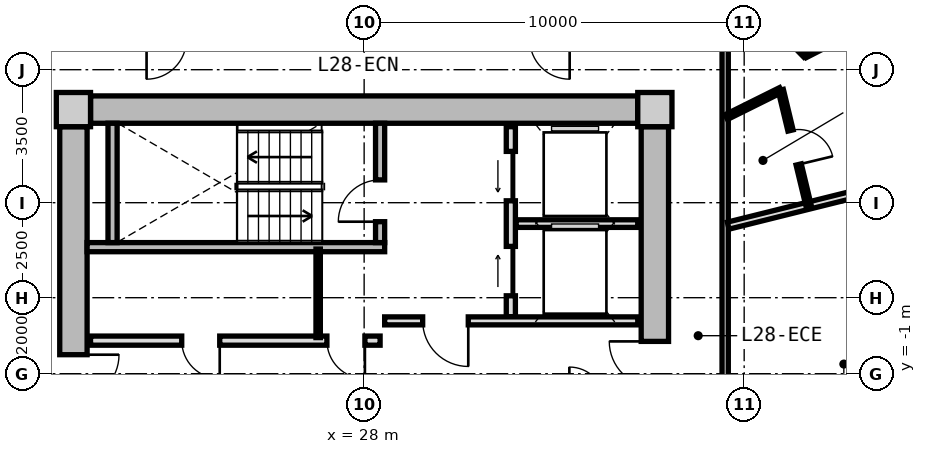
"""IFC4 building model, lengths in metres.
Left out: names, types, materials, properties, quantities, classifications, styles, units other than length and angle.
Written with IfcOpenShell. Run it as: python <this file> out.ifc"""

import sys

from ifc_helpers import new_model, si_unit, direction, frame, frame_2d, origin, origin_2d, place, context, subcontext, project, spatial, rectangle, extrude, source, transform, mapped, element, fill, save


model = new_model("IFC4")
c1 = context("Model", 3, precision=1e-05, world=origin(), true_north=direction((0.0, 1.0)))
c2 = subcontext(c1, "Body", "Model", "MODEL_VIEW")
j1 = project(units=[si_unit("LENGTHUNIT", "METRE"), si_unit("PLANEANGLEUNIT", "RADIAN")], contexts=[c1])
p1 = place(None, origin())
s1 = spatial("IfcSite", under=j1, at=p1, CompositionType="ELEMENT")
p2 = place(p1, origin())
s2 = spatial("IfcBuilding", under=s1, at=p2, CompositionType="ELEMENT")
p3 = place(p2, frame((0.0, 0.0, 93.2)))
s3 = spatial("IfcBuildingStorey", under=s2, at=p3, CompositionType="ELEMENT", Elevation=93.2)
m1 = source(origin(), c2, "Body", "SweptSolid", [
    extrude(rectangle(XDim=0.9, YDim=0.9, at=origin_2d()), origin(), (0.0, 0.0, 1.0), 3.05),
])
for number, where, z_axis, x_axis in (
    (1, (35.65, 5.95, 0.0), (0.0, 0.0, 1.0), (1.0, 0.0, 0.0)),
    (2, (20.35, 5.95, 0.0), (0.0, 0.0, 1.0), (1.0, 0.0, 0.0)),
):
    element("IfcColumn", number, at=place(p3, frame(where, z_axis=z_axis, x_axis=x_axis)), inside=s3, PredefinedType="COLUMN", context=c2, shape_type="MappedRepresentation", body=[
        mapped(m1, transform((0.0, 0.0, 0.0), x_axis=(1.0, 0.0, 0.0), y_axis=(0.0, 1.0, 0.0), z_axis=(0.0, 0.0, 1.0), scale=1.0)),
    ])
m2 = source(origin(), c2, "Body", "SweptSolid", [
    extrude(rectangle(XDim=14.4, YDim=0.72, at=frame_2d((7.2, 0.0))), origin(), (0.0, 0.0, 1.0), 2.79),
])
p4 = place(p3, frame((20.8, 5.95, 0.0), z_axis=(0.0, 0.0, 1.0), x_axis=(1.0, 0.0, 0.0)))
e3 = element("IfcWall", 3, at=p4, inside=s3, PredefinedType="SHEAR", context=c2, shape_type="MappedRepresentation", body=[
    mapped(m2, transform((0.0, 0.0, 0.0), x_axis=(1.0, 0.0, 0.0), y_axis=(0.0, 1.0, 0.0), z_axis=(0.0, 0.0, 1.0), scale=1.0)),
])
m3 = source(origin(), c2, "Body", "SweptSolid", [
    extrude(rectangle(XDim=11.0, YDim=0.72, at=frame_2d((5.5, 0.0))), origin(), (0.0, 0.0, 1.0), 2.79),
])
p5 = place(p3, frame((20.35, -5.5, 0.0), z_axis=(0.0, 0.0, 1.0), x_axis=(0.0, 1.0, 0.0)))
e4 = element("IfcWall", 4, at=p5, inside=s3, PredefinedType="SHEAR", context=c2, shape_type="MappedRepresentation", body=[
    mapped(m3, transform((0.0, 0.0, 0.0), x_axis=(1.0, 0.0, 0.0), y_axis=(0.0, 1.0, 0.0), z_axis=(0.0, 0.0, 1.0), scale=1.0)),
])
p6 = place(p5, frame((3.8, 0.0, 0.0)))
e5 = element("IfcOpeningElement", 5, at=p6, cuts=e4, PredefinedType="OPENING", context=c2, shape_type="SweptSolid", body=[
    extrude(rectangle(XDim=1.2, YDim=2.15, at=frame_2d((0.6, 1.075))), frame((0.0, 0.37, 0.0), z_axis=(0.0, -1.0, 0.0), x_axis=(1.0, 0.0, 0.0)), (0.0, 0.0, 1.0), 0.74),
])
p7 = place(p3, frame((35.65, 5.5, 0.0), z_axis=(0.0, 0.0, 1.0), x_axis=(0.0, -1.0, 0.0)))
e6 = element("IfcWall", 6, at=p7, inside=s3, PredefinedType="SHEAR", context=c2, shape_type="MappedRepresentation", body=[
    mapped(m3, transform((0.0, 0.0, 0.0), x_axis=(1.0, 0.0, 0.0), y_axis=(0.0, 1.0, 0.0), z_axis=(0.0, 0.0, 1.0), scale=1.0)),
])
p8 = place(p7, frame((5.65, 0.0, 0.0)))
e7 = element("IfcOpeningElement", 7, at=p8, cuts=e6, PredefinedType="OPENING", context=c2, shape_type="SweptSolid", body=[
    extrude(rectangle(XDim=1.2, YDim=2.15, at=frame_2d((0.6, 1.075))), frame((0.0, 0.37, 0.0), z_axis=(0.0, -1.0, 0.0), x_axis=(1.0, 0.0, 0.0)), (0.0, 0.0, 1.0), 0.74),
])
p9 = place(p7, frame((9.3, 0.0, 0.0)))
e8 = element("IfcOpeningElement", 8, at=p9, cuts=e6, PredefinedType="OPENING", context=c2, shape_type="SweptSolid", body=[
    extrude(rectangle(XDim=1.0, YDim=2.1, at=frame_2d((0.5, 1.05))), frame((0.0, 0.37, 0.0), z_axis=(0.0, -1.0, 0.0), x_axis=(1.0, 0.0, 0.0)), (0.0, 0.0, 1.0), 0.74),
])
m4 = source(origin(), c2, "Body", "SweptSolid", [
    extrude(rectangle(XDim=7.83, YDim=0.24, at=frame_2d((3.915, 0.0))), origin(), (0.0, 0.0, 1.0), 2.79),
])
p10 = place(p3, frame((20.71, 2.33, 0.0), z_axis=(0.0, 0.0, 1.0), x_axis=(1.0, 0.0, 0.0)))
e9 = element("IfcWall", 9, at=p10, inside=s3, PredefinedType="PARTITIONING", context=c2, shape_type="MappedRepresentation", body=[
    mapped(m4, transform((0.0, 0.0, 0.0), x_axis=(1.0, 0.0, 0.0), y_axis=(0.0, 1.0, 0.0), z_axis=(0.0, 0.0, 1.0), scale=1.0)),
])
m5 = source(origin(), c2, "Body", "SweptSolid", [
    extrude(rectangle(XDim=3.14, YDim=0.24, at=frame_2d((1.57, 0.0))), origin(), (0.0, 0.0, 1.0), 2.79),
])
p11 = place(p3, frame((21.38, 2.45, 0.0), z_axis=(0.0, 0.0, 1.0), x_axis=(0.0, 1.0, 0.0)))
e10 = element("IfcWall", 10, at=p11, inside=s3, PredefinedType="PARTITIONING", context=c2, shape_type="MappedRepresentation", body=[
    mapped(m5, transform((0.0, 0.0, 0.0), x_axis=(1.0, 0.0, 0.0), y_axis=(0.0, 1.0, 0.0), z_axis=(0.0, 0.0, 1.0), scale=1.0)),
])
p12 = place(p3, frame((28.42, 2.45, 0.0), z_axis=(0.0, 0.0, 1.0), x_axis=(0.0, 1.0, 0.0)))
e11 = element("IfcWall", 11, at=p12, inside=s3, PredefinedType="PARTITIONING", context=c2, shape_type="MappedRepresentation", body=[
    mapped(m5, transform((0.0, 0.0, 0.0), x_axis=(1.0, 0.0, 0.0), y_axis=(0.0, 1.0, 0.0), z_axis=(0.0, 0.0, 1.0), scale=1.0)),
])
p13 = place(p12, frame((0.55, 0.0, 0.0)))
e12 = element("IfcOpeningElement", 12, at=p13, cuts=e11, PredefinedType="OPENING", context=c2, shape_type="SweptSolid", body=[
    extrude(rectangle(XDim=1.1, YDim=2.15, at=frame_2d((0.55, 1.075))), frame((0.0, 0.13, 0.0), z_axis=(0.0, -1.0, 0.0), x_axis=(1.0, 0.0, 0.0)), (0.0, 0.0, 1.0), 0.26),
])
m6 = source(origin(), c2, "Body", "SweptSolid", [
    extrude(rectangle(XDim=5.0, YDim=0.24, at=frame_2d((2.5, 0.0))), origin(), (0.0, 0.0, 1.0), 2.775),
])
p14 = place(p3, frame((31.86, 0.5, 0.0), z_axis=(0.0, 0.0, 1.0), x_axis=(0.0, 1.0, 0.0)))
e13 = element("IfcWall", 13, at=p14, inside=s3, PredefinedType="PARTITIONING", context=c2, shape_type="MappedRepresentation", body=[
    mapped(m6, transform((0.0, 0.0, 0.0), x_axis=(1.0, 0.0, 0.0), y_axis=(0.0, 1.0, 0.0), z_axis=(0.0, 0.0, 1.0), scale=1.0)),
])
p15 = place(p14, frame((3.05, 0.0, 0.0)))
e14 = element("IfcOpeningElement", 14, at=p15, cuts=e13, PredefinedType="OPENING", context=c2, shape_type="SweptSolid", body=[
    extrude(rectangle(XDim=1.3, YDim=2.2, at=frame_2d((0.65, 1.1))), frame((0.0, 0.13, 0.0), z_axis=(0.0, -1.0, 0.0), x_axis=(1.0, 0.0, 0.0)), (0.0, 0.0, 1.0), 0.26),
])
p16 = place(p14, frame((0.55, 0.0, 0.0)))
e15 = element("IfcOpeningElement", 15, at=p16, cuts=e13, PredefinedType="OPENING", context=c2, shape_type="SweptSolid", body=[
    extrude(rectangle(XDim=1.3, YDim=2.2, at=frame_2d((0.65, 1.1))), frame((0.0, 0.13, 0.0), z_axis=(0.0, -1.0, 0.0), x_axis=(1.0, 0.0, 0.0)), (0.0, 0.0, 1.0), 0.26),
])
m7 = source(origin(), c2, "Body", "SweptSolid", [
    extrude(rectangle(XDim=3.2, YDim=0.2, at=frame_2d((1.6, 0.0))), origin(), (0.0, 0.0, 1.0), 2.775),
])
p17 = place(p3, frame((32.0, 2.95, 0.0), z_axis=(0.0, 0.0, 1.0), x_axis=(1.0, 0.0, 0.0)))
e16 = element("IfcWall", 16, at=p17, inside=s3, PredefinedType="PARTITIONING", context=c2, shape_type="MappedRepresentation", body=[
    mapped(m7, transform((0.0, 0.0, 0.0), x_axis=(1.0, 0.0, 0.0), y_axis=(0.0, 1.0, 0.0), z_axis=(0.0, 0.0, 1.0), scale=1.0)),
])
m8 = source(origin(), c2, "Body", "SweptSolid", [
    extrude(rectangle(XDim=6.66, YDim=0.21, at=frame_2d((3.33, 0.0))), origin(), (0.0, 0.0, 1.0), 2.775),
])
p18 = place(p3, frame((28.54, 0.39, 0.0), z_axis=(0.0, 0.0, 1.0), x_axis=(1.0, 0.0, 0.0)))
e17 = element("IfcWall", 17, at=p18, inside=s3, PredefinedType="PARTITIONING", context=c2, shape_type="MappedRepresentation", body=[
    mapped(m8, transform((0.0, 0.0, 0.0), x_axis=(1.0, 0.0, 0.0), y_axis=(0.0, 1.0, 0.0), z_axis=(0.0, 0.0, 1.0), scale=1.0)),
])
p19 = place(p18, frame((1.0, 0.0, 0.0)))
e18 = element("IfcOpeningElement", 18, at=p19, cuts=e17, PredefinedType="OPENING", context=c2, shape_type="SweptSolid", body=[
    extrude(rectangle(XDim=1.2, YDim=2.15, at=frame_2d((0.6, 1.075))), frame((0.0, 0.115, 0.0), z_axis=(0.0, -1.0, 0.0), x_axis=(1.0, 0.0, 0.0)), (0.0, 0.0, 1.0), 0.23),
])
m9 = source(origin(), c2, "Body", "SweptSolid", [
    extrude(rectangle(XDim=7.62, YDim=0.24, at=frame_2d((3.81, 0.0))), origin(), (0.0, 0.0, 1.0), 2.775),
])
p20 = place(p3, frame((20.8, -0.13, 0.0), z_axis=(0.0, 0.0, 1.0), x_axis=(1.0, 0.0, 0.0)))
e19 = element("IfcWall", 19, at=p20, inside=s3, PredefinedType="PARTITIONING", context=c2, shape_type="MappedRepresentation", body=[
    mapped(m9, transform((0.0, 0.0, 0.0), x_axis=(1.0, 0.0, 0.0), y_axis=(0.0, 1.0, 0.0), z_axis=(0.0, 0.0, 1.0), scale=1.0)),
])
p21 = place(p20, frame((6.22, 0.0, 0.0)))
e20 = element("IfcOpeningElement", 20, at=p21, cuts=e19, PredefinedType="OPENING", context=c2, shape_type="SweptSolid", body=[
    extrude(rectangle(XDim=1.0, YDim=2.1, at=frame_2d((0.5, 1.05))), frame((0.0, 0.13, 0.0), z_axis=(0.0, -1.0, 0.0), x_axis=(1.0, 0.0, 0.0)), (0.0, 0.0, 1.0), 0.26),
])
p22 = place(p20, frame((2.4, 0.0, 0.0)))
e21 = element("IfcOpeningElement", 21, at=p22, cuts=e19, PredefinedType="OPENING", context=c2, shape_type="SweptSolid", body=[
    extrude(rectangle(XDim=1.0, YDim=2.1, at=frame_2d((0.5, 1.05))), frame((0.0, 0.13, 0.0), z_axis=(0.0, -1.0, 0.0), x_axis=(1.0, 0.0, 0.0)), (0.0, 0.0, 1.0), 0.26),
])
m10 = source(origin(), c2, "Body", "SweptSolid", [
    extrude(rectangle(XDim=2.33, YDim=0.115, at=frame_2d((1.165, 0.0))), origin(), (0.0, 0.0, 1.0), 2.775),
])
p23 = place(p3, frame((26.79, -0.05, 0.0), z_axis=(0.0, 0.0, 1.0), x_axis=(0.0, 1.0, 0.0)))
e22 = element("IfcWall", 22, at=p23, inside=s3, PredefinedType="PARTITIONING", context=c2, shape_type="MappedRepresentation", body=[
    mapped(m10, transform((0.0, 0.0, 0.0), x_axis=(1.0, 0.0, 0.0), y_axis=(0.0, 1.0, 0.0), z_axis=(0.0, 0.0, 1.0), scale=1.0)),
])
m11 = source(origin(), c2, "Body", "SweptSolid", [
    extrude(rectangle(XDim=15.6, YDim=0.165, at=frame_2d((7.8, 0.0))), origin(), (0.0, 0.0, 1.0), 2.775),
])
p24 = place(p3, frame((37.5, 7.8, 0.0), z_axis=(0.0, 0.0, 1.0), x_axis=(0.0, -1.0, 0.0)))
e23 = element("IfcWall", 23, at=p24, inside=s3, PredefinedType="PARTITIONING", context=c2, shape_type="MappedRepresentation", body=[
    mapped(m11, transform((0.0, 0.0, 0.0), x_axis=(1.0, 0.0, 0.0), y_axis=(0.0, 1.0, 0.0), z_axis=(0.0, 0.0, 1.0), scale=1.0)),
])
p25 = place(p24, frame((9.482, 0.0, 0.0)))
e24 = element("IfcOpeningElement", 24, at=p25, cuts=e23, PredefinedType="OPENING", context=c2, shape_type="SweptSolid", body=[
    extrude(rectangle(XDim=1.25, YDim=2.2, at=frame_2d((0.625, 1.1))), frame((0.0, 0.093, 0.0), z_axis=(0.0, -1.0, 0.0), x_axis=(1.0, 0.0, 0.0)), (0.0, 0.0, 1.0), 0.185),
])
m12 = source(origin(), c2, "Body", "SweptSolid", [
    extrude(rectangle(XDim=6.331, YDim=0.19, at=frame_2d((3.165, 0.0))), origin(), (0.0, 0.0, 1.0), 2.275),
])
p26 = place(p3, frame((37.58, 2.896, 0.0), z_axis=(0.0, 0.0, 1.0), x_axis=(0.97036440661, 0.241646267062, 0.0)))
e25 = element("IfcWall", 25, at=p26, inside=s3, PredefinedType="PARTITIONING", context=c2, shape_type="MappedRepresentation", body=[
    mapped(m12, transform((0.0, 0.0, 0.0), x_axis=(1.0, 0.0, 0.0), y_axis=(0.0, 1.0, 0.0), z_axis=(0.0, 0.0, 1.0), scale=1.0)),
])
m13 = source(origin(), c2, "Body", "SweptSolid", [
    extrude(rectangle(XDim=1.6, YDim=0.14, at=frame_2d((0.8, 0.0))), origin(), (0.0, 0.0, 1.0), 2.775),
])
p27 = place(p3, frame((37.53, 5.754, 0.0), z_axis=(0.0, 0.0, 1.0), x_axis=(0.895522919837, 0.445015393044, 0.0)))
e26 = element("IfcWall", 26, at=p27, inside=s3, PredefinedType="PARTITIONING", context=c2, shape_type="MappedRepresentation", body=[
    mapped(m13, transform((0.0, 0.0, 0.0), x_axis=(1.0, 0.0, 0.0), y_axis=(0.0, 1.0, 0.0), z_axis=(0.0, 0.0, 1.0), scale=1.0)),
])
m14 = source(origin(), c2, "Body", "SweptSolid", [
    extrude(rectangle(XDim=3.112, YDim=0.14, at=frame_2d((1.556, 0.0))), origin(), (0.0, 0.0, 1.0), 2.415),
])
p28 = place(p3, frame((38.963, 6.466, 0.0), z_axis=(0.0, 0.0, 1.0), x_axis=(0.233737944029, -0.972299631555, 0.0)))
e27 = element("IfcWall", 27, at=p28, inside=s3, PredefinedType="PARTITIONING", context=c2, shape_type="MappedRepresentation", body=[
    mapped(m14, transform((0.0, 0.0, 0.0), x_axis=(1.0, 0.0, 0.0), y_axis=(0.0, 1.0, 0.0), z_axis=(0.0, 0.0, 1.0), scale=1.0)),
])
p29 = place(p28, frame((1.096, 0.0, 0.0)))
e28 = element("IfcOpeningElement", 28, at=p29, cuts=e27, PredefinedType="OPENING", context=c2, shape_type="SweptSolid", body=[
    extrude(rectangle(XDim=0.92, YDim=2.1, at=frame_2d((0.46, 1.05))), frame((0.0, 0.08, 0.0), z_axis=(0.0, -1.0, 0.0), x_axis=(1.0, 0.0, 0.0)), (0.0, 0.0, 1.0), 0.16),
])
m15 = source(origin(), c2, "Body", "SweptSolid", [
    extrude(rectangle(XDim=1.945, YDim=0.115, at=frame_2d((0.973, 0.0))), origin(), (0.0, 0.0, 1.0), 2.775),
])
p30 = place(p3, frame((39.611, 7.37, 0.0), z_axis=(0.0, 0.0, 1.0), x_axis=(0.889684148329, 0.456576517368, 0.0)))
e29 = element("IfcWall", 29, at=p30, inside=s3, PredefinedType="PARTITIONING", context=c2, shape_type="MappedRepresentation", body=[
    mapped(m15, transform((0.0, 0.0, 0.0), x_axis=(1.0, 0.0, 0.0), y_axis=(0.0, 1.0, 0.0), z_axis=(0.0, 0.0, 1.0), scale=1.0)),
])
m16 = source(origin(), c2, "Body", "SweptSolid", [
    extrude(rectangle(XDim=3.943, YDim=0.115, at=frame_2d((1.972, 0.0))), origin(), (0.0, 0.0, 1.0), 2.775),
])
p31 = place(p3, frame((39.611, 7.37, 0.0), z_axis=(0.0, 0.0, 1.0), x_axis=(-0.699481885754, 0.714650328134, 0.0)))
e30 = element("IfcWall", 30, at=p31, inside=s3, PredefinedType="PARTITIONING", context=c2, shape_type="MappedRepresentation", body=[
    mapped(m16, transform((0.0, 0.0, 0.0), x_axis=(1.0, 0.0, 0.0), y_axis=(0.0, 1.0, 0.0), z_axis=(0.0, 0.0, 1.0), scale=1.0)),
])
p32 = place(p31, frame((1.497, 0.0, 0.0)))
e31 = element("IfcOpeningElement", 31, at=p32, cuts=e30, PredefinedType="OPENING", context=c2, shape_type="SweptSolid", body=[
    extrude(rectangle(XDim=0.95, YDim=2.1, at=frame_2d((0.475, 1.05))), frame((0.0, 0.067, 0.0), z_axis=(0.0, -1.0, 0.0), x_axis=(1.0, 0.0, 0.0)), (0.0, 0.0, 1.0), 0.135),
])
m17 = source(origin(), c2, "Body", "SweptSolid", [
    extrude(rectangle(XDim=1.1, YDim=2.15, at=frame_2d((0.55, 1.075))), frame((0.0, 0.025, 0.0), z_axis=(0.0, -1.0, 0.0), x_axis=(1.0, 0.0, 0.0)), (0.0, 0.0, 1.0), 0.05),
])
p33 = place(p13, origin())
e32 = element("IfcDoor", 32, at=p33, inside=s3, OperationType="SINGLE_SWING_LEFT", PredefinedType="DOOR", context=c2, shape_type="MappedRepresentation", body=[
    mapped(m17, transform((0.0, 0.0, 0.0), x_axis=(1.0, 0.0, 0.0), y_axis=(0.0, 1.0, 0.0), z_axis=(0.0, 0.0, 1.0), scale=1.0)),
])
fill(e12, e32)
m18 = source(origin(), c2, "Body", "SweptSolid", [
    extrude(rectangle(XDim=1.3, YDim=2.2, at=frame_2d((0.65, 1.1))), frame((0.0, 0.025, 0.0), z_axis=(0.0, -1.0, 0.0), x_axis=(1.0, 0.0, 0.0)), (0.0, 0.0, 1.0), 0.05),
])
p34 = place(p15, origin())
e33 = element("IfcDoor", 33, at=p34, inside=s3, OperationType="SLIDING_TO_LEFT", PredefinedType="DOOR", context=c2, shape_type="MappedRepresentation", body=[
    mapped(m18, transform((0.0, 0.0, 0.0), x_axis=(1.0, 0.0, 0.0), y_axis=(0.0, 1.0, 0.0), z_axis=(0.0, 0.0, 1.0), scale=1.0)),
])
fill(e14, e33)
p35 = place(p16, origin())
e34 = element("IfcDoor", 34, at=p35, inside=s3, OperationType="SLIDING_TO_RIGHT", PredefinedType="DOOR", context=c2, shape_type="MappedRepresentation", body=[
    mapped(m18, transform((0.0, 0.0, 0.0), x_axis=(1.0, 0.0, 0.0), y_axis=(0.0, 1.0, 0.0), z_axis=(0.0, 0.0, 1.0), scale=1.0)),
])
fill(e15, e34)
m19 = source(origin(), c2, "Body", "SweptSolid", [
    extrude(rectangle(XDim=1.2, YDim=2.15, at=frame_2d((0.6, 1.075))), frame((0.0, 0.025, 0.0), z_axis=(0.0, -1.0, 0.0), x_axis=(1.0, 0.0, 0.0)), (0.0, 0.0, 1.0), 0.05),
])
p36 = place(p19, frame((1.2, 0.0, 0.0), z_axis=(0.0, 0.0, 1.0), x_axis=(-1.0, 0.0, 0.0)))
e35 = element("IfcDoor", 35, at=p36, inside=s3, OperationType="SINGLE_SWING_LEFT", PredefinedType="DOOR", context=c2, shape_type="MappedRepresentation", body=[
    mapped(m19, transform((0.0, 0.0, 0.0), x_axis=(1.0, 0.0, 0.0), y_axis=(0.0, 1.0, 0.0), z_axis=(0.0, 0.0, 1.0), scale=1.0)),
])
fill(e18, e35)
p37 = place(p6, frame((1.2, 0.0, 0.0), z_axis=(0.0, 0.0, 1.0), x_axis=(-1.0, 0.0, 0.0)))
e36 = element("IfcDoor", 36, at=p37, inside=s3, OperationType="SINGLE_SWING_LEFT", PredefinedType="DOOR", context=c2, shape_type="MappedRepresentation", body=[
    mapped(m19, transform((0.0, 0.0, 0.0), x_axis=(1.0, 0.0, 0.0), y_axis=(0.0, 1.0, 0.0), z_axis=(0.0, 0.0, 1.0), scale=1.0)),
])
fill(e5, e36)
p38 = place(p8, frame((1.2, 0.0, 0.0), z_axis=(0.0, 0.0, 1.0), x_axis=(-1.0, 0.0, 0.0)))
e37 = element("IfcDoor", 37, at=p38, inside=s3, OperationType="SINGLE_SWING_RIGHT", PredefinedType="DOOR", context=c2, shape_type="MappedRepresentation", body=[
    mapped(m19, transform((0.0, 0.0, 0.0), x_axis=(1.0, 0.0, 0.0), y_axis=(0.0, 1.0, 0.0), z_axis=(0.0, 0.0, 1.0), scale=1.0)),
])
fill(e7, e37)
m20 = source(origin(), c2, "Body", "SweptSolid", [
    extrude(rectangle(XDim=1.0, YDim=2.1, at=frame_2d((0.5, 1.05))), frame((0.0, 0.025, 0.0), z_axis=(0.0, -1.0, 0.0), x_axis=(1.0, 0.0, 0.0)), (0.0, 0.0, 1.0), 0.05),
])
p39 = place(p21, frame((1.0, 0.0, 0.0), z_axis=(0.0, 0.0, 1.0), x_axis=(-1.0, 0.0, 0.0)))
e38 = element("IfcDoor", 38, at=p39, inside=s3, OperationType="SINGLE_SWING_LEFT", PredefinedType="DOOR", context=c2, shape_type="MappedRepresentation", body=[
    mapped(m20, transform((0.0, 0.0, 0.0), x_axis=(1.0, 0.0, 0.0), y_axis=(0.0, 1.0, 0.0), z_axis=(0.0, 0.0, 1.0), scale=1.0)),
])
fill(e20, e38)
p40 = place(p22, frame((1.0, 0.0, 0.0), z_axis=(0.0, 0.0, 1.0), x_axis=(-1.0, 0.0, 0.0)))
e39 = element("IfcDoor", 39, at=p40, inside=s3, OperationType="SINGLE_SWING_LEFT", PredefinedType="DOOR", context=c2, shape_type="MappedRepresentation", body=[
    mapped(m20, transform((0.0, 0.0, 0.0), x_axis=(1.0, 0.0, 0.0), y_axis=(0.0, 1.0, 0.0), z_axis=(0.0, 0.0, 1.0), scale=1.0)),
])
fill(e21, e39)
m21 = source(origin(), c2, "Body", "SweptSolid", [
    extrude(rectangle(XDim=0.92, YDim=2.1, at=frame_2d((0.46, 1.05))), frame((0.0, 0.025, 0.0), z_axis=(0.0, -1.0, 0.0), x_axis=(1.0, 0.0, 0.0)), (0.0, 0.0, 1.0), 0.05),
])
p41 = place(p29, origin())
e40 = element("IfcDoor", 40, at=p41, inside=s3, OperationType="SINGLE_SWING_RIGHT", PredefinedType="DOOR", context=c2, shape_type="MappedRepresentation", body=[
    mapped(m21, transform((0.0, 0.0, 0.0), x_axis=(1.0, 0.0, 0.0), y_axis=(0.0, 1.0, 0.0), z_axis=(0.0, 0.0, 1.0), scale=1.0)),
])
fill(e28, e40)
save(model, sys.argv[1])
